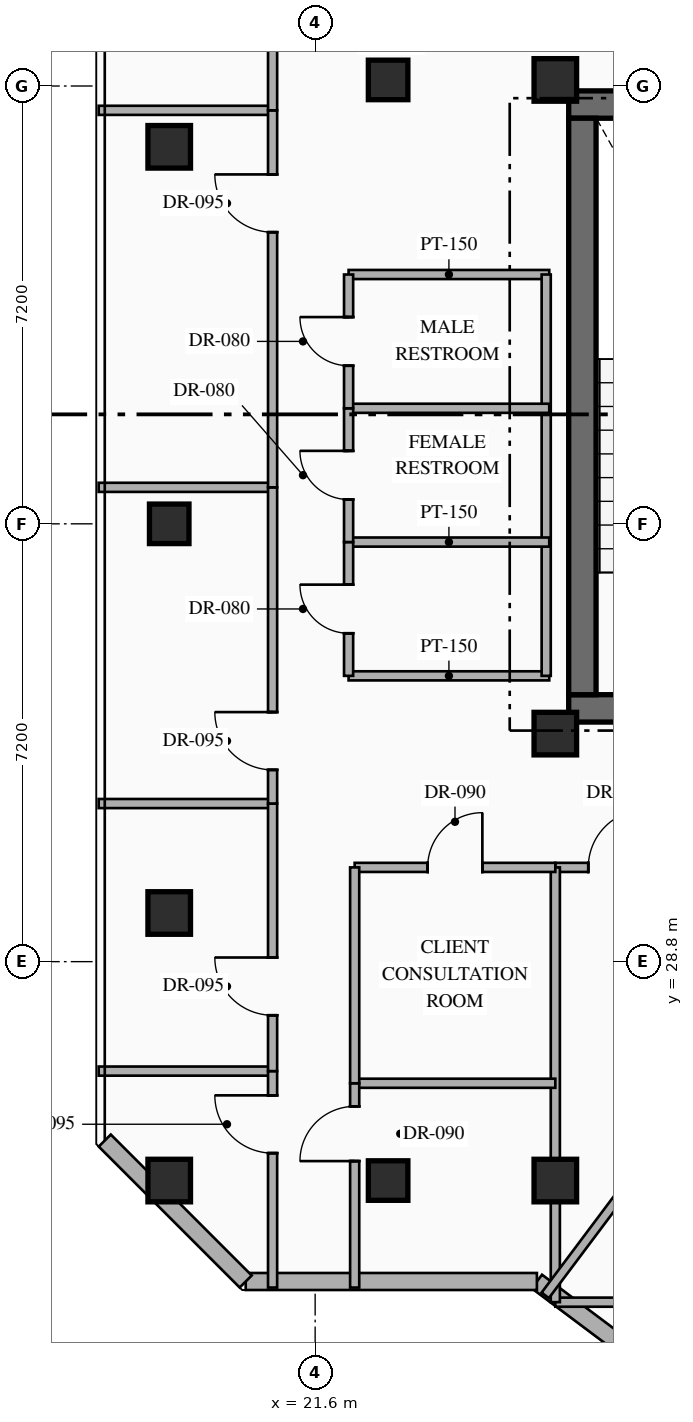
"""IFC4 building model, lengths in metres.
Left out: names, types, materials, properties, quantities, classifications, styles, units other than length and angle.
Written with IfcOpenShell. Run it as: python <this file> out.ifc"""

import sys

from ifc_helpers import new_model, si_unit, direction, frame, frame_2d, origin, origin_2d, place, context, subcontext, project, spatial, rectangle, hollow_rectangle, extrude, element, fill, save


model = new_model("IFC4")
c1 = context("Model", 3, precision=1e-05, world=origin(), true_north=direction((0.0, 1.0)))
c2 = subcontext(c1, "Body", "Model", "MODEL_VIEW")
j1 = project(units=[si_unit("LENGTHUNIT", "METRE"), si_unit("PLANEANGLEUNIT", "RADIAN")], contexts=[c1])
p1 = place(None, origin())
s1 = spatial("IfcSite", under=j1, at=p1, CompositionType="ELEMENT")
p2 = place(p1, origin())
s2 = spatial("IfcBuilding", under=s1, at=p2, CompositionType="ELEMENT")
p3 = place(p2, frame((0.0, 0.0, 223.95)))
s3 = spatial("IfcBuildingStorey", under=s2, at=p3, CompositionType="ELEMENT", Elevation=223.95)
p4 = place(p3, frame((25.77, 32.965, 0.0), z_axis=(0.0, 0.0, 1.0), x_axis=(1.0, 0.0, 0.0)))
e1 = element("IfcWall", 1, at=p4, inside=s3, PredefinedType="SHEAR", context=c2, shape_type="SweptSolid", body=[
    extrude(rectangle(XDim=7.48, YDim=0.45, at=frame_2d((3.74, 0.0))), origin(), (0.0, 0.0, 1.0), 3.6),
])
p5 = place(p4, frame((2.68, 0.0, 0.0)))
e2 = element("IfcOpeningElement", 2, at=p5, cuts=e1, PredefinedType="OPENING", context=c2, shape_type="SweptSolid", body=[
    extrude(rectangle(XDim=1.1, YDim=2.2, at=frame_2d((0.55, 1.1))), frame((0.0, 0.235, 0.0), z_axis=(0.0, -1.0, 0.0), x_axis=(1.0, 0.0, 0.0)), (0.0, 0.0, 1.0), 0.47),
])
p6 = place(p4, frame((5.43, 0.0, 0.0)))
e3 = element("IfcOpeningElement", 3, at=p6, cuts=e1, PredefinedType="OPENING", context=c2, shape_type="SweptSolid", body=[
    extrude(rectangle(XDim=1.1, YDim=2.15, at=frame_2d((0.55, 1.075))), frame((0.0, 0.235, 0.0), z_axis=(0.0, -1.0, 0.0), x_axis=(1.0, 0.0, 0.0)), (0.0, 0.0, 1.0), 0.47),
])
p7 = place(p3, frame((25.77, 42.895, 0.0), z_axis=(0.0, 0.0, 1.0), x_axis=(1.0, 0.0, 0.0)))
e4 = element("IfcWall", 4, at=p7, inside=s3, PredefinedType="SHEAR", context=c2, shape_type="SweptSolid", body=[
    extrude(rectangle(XDim=7.48, YDim=0.45, at=frame_2d((3.74, 0.0))), origin(), (0.0, 0.0, 1.0), 3.6),
])
p8 = place(p3, frame((25.995, 33.19, 0.0), z_axis=(0.0, 0.0, 1.0), x_axis=(0.0, 1.0, 0.0)))
e5 = element("IfcWall", 5, at=p8, inside=s3, PredefinedType="SHEAR", context=c2, shape_type="SweptSolid", body=[
    extrude(rectangle(XDim=9.48, YDim=0.45, at=frame_2d((4.74, 0.0))), origin(), (0.0, 0.0, 1.0), 3.6),
])
for number, where, z_axis, x_axis in (
    (6, (25.55, 32.55, 0.0), (0.0, 0.0, 1.0), (1.0, 0.0, 0.0)),
    (7, (25.55, 43.3, 0.0), (0.0, 0.0, 1.0), (1.0, 0.0, 0.0)),
    (8, (25.55, 25.2, 0.0), (0.0, 0.0, 1.0), (1.0, 0.0, 0.0)),
    (9, (19.2, 25.2, 0.0), (0.0, 0.0, 1.0), (1.0, 0.0, 0.0)),
    (10, (19.2, 29.6, 0.0), (0.0, 0.0, 1.0), (1.0, 0.0, 0.0)),
    (11, (19.2, 42.2, 0.0), (0.0, 0.0, 1.0), (1.0, 0.0, 0.0)),
):
    element("IfcColumn", number, at=place(p3, frame(where, z_axis=z_axis, x_axis=x_axis)), inside=s3, PredefinedType="COLUMN", context=c2, shape_type="SweptSolid", body=[
        extrude(hollow_rectangle(XDim=0.7, YDim=0.7, WallThickness=0.028, at=origin_2d()), origin(), (0.0, 0.0, 1.0), 3.6),
    ])
for number, where, z_axis, x_axis in (
    (12, (22.8, 25.2, 0.0), (0.0, 0.0, 1.0), (1.0, 0.0, 0.0)),
    (13, (22.8, 43.3, 0.0), (0.0, 0.0, 1.0), (1.0, 0.0, 0.0)),
    (14, (19.2, 36.0, 0.0), (0.0, 0.0, 1.0), (1.0, 0.0, 0.0)),
):
    element("IfcColumn", number, at=place(p3, frame(where, z_axis=z_axis, x_axis=x_axis)), inside=s3, PredefinedType="COLUMN", context=c2, shape_type="SweptSolid", body=[
        extrude(hollow_rectangle(XDim=0.65, YDim=0.65, WallThickness=0.025, at=origin_2d()), origin(), (0.0, 0.0, 1.0), 3.6),
    ])
p9 = place(p3, frame((44.918, 8.787, 0.0), z_axis=(0.0, 0.0, 1.0), x_axis=(-0.800004765927, 0.599993645378, 0.0)))
e15 = element("IfcWall", 15, at=p9, inside=s3, PredefinedType="STANDARD", context=c2, shape_type="SweptSolid", body=[
    extrude(rectangle(XDim=24.588, YDim=0.28, at=frame_2d((12.294, 0.0))), origin(), (0.0, 0.0, 1.0), 3.35),
])
p10 = place(p3, frame((25.247, 23.54, 0.0), z_axis=(0.0, 0.0, 1.0), x_axis=(-1.0, 0.0, 0.0)))
e16 = element("IfcWall", 16, at=p10, inside=s3, PredefinedType="STANDARD", context=c2, shape_type="SweptSolid", body=[
    extrude(rectangle(XDim=4.789, YDim=0.28, at=frame_2d((2.395, 0.0))), origin(), (0.0, 0.0, 1.0), 3.35),
])
p11 = place(p3, frame((20.458, 23.54, 0.0), z_axis=(0.0, 0.0, 1.0), x_axis=(-0.707144017911, 0.707069542501, 0.0)))
e17 = element("IfcWall", 17, at=p11, inside=s3, PredefinedType="STANDARD", context=c2, shape_type="SweptSolid", body=[
    extrude(rectangle(XDim=3.278, YDim=0.28, at=frame_2d((1.639, 0.0))), origin(), (0.0, 0.0, 1.0), 3.35),
])
for number, where, z_axis, x_axis in (
    (18, (22.15, 33.5, 0.0), (0.0, 0.0, 1.0), (1.0, 0.0, 0.0)),
    (19, (22.15, 40.1, 0.0), (0.0, 0.0, 1.0), (1.0, 0.0, 0.0)),
):
    element("IfcWall", number, at=place(p3, frame(where, z_axis=z_axis, x_axis=x_axis)), inside=s3, PredefinedType="PARTITIONING", context=c2, shape_type="SweptSolid", body=[
        extrude(rectangle(XDim=3.3, YDim=0.15, at=frame_2d((1.65, 0.0))), origin(), (0.0, 0.0, 1.0), 3.35),
    ])
p12 = place(p3, frame((25.4, 33.5, 0.0), z_axis=(0.0, 0.0, 1.0), x_axis=(0.0, 1.0, 0.0)))
e20 = element("IfcWall", 20, at=p12, inside=s3, PredefinedType="PARTITIONING", context=c2, shape_type="SweptSolid", body=[
    extrude(rectangle(XDim=6.6, YDim=0.15, at=frame_2d((3.3, 0.0))), origin(), (0.0, 0.0, 1.0), 3.35),
])
for number, where, z_axis, x_axis in (
    (21, (22.15, 35.7, 0.0), (0.0, 0.0, 1.0), (1.0, 0.0, 0.0)),
    (22, (22.15, 37.9, 0.0), (0.0, 0.0, 1.0), (1.0, 0.0, 0.0)),
):
    element("IfcWall", number, at=place(p3, frame(where, z_axis=z_axis, x_axis=x_axis)), inside=s3, PredefinedType="PARTITIONING", context=c2, shape_type="SweptSolid", body=[
        extrude(rectangle(XDim=3.3, YDim=0.15, at=frame_2d((1.65, 0.0))), origin(), (0.0, 0.0, 1.0), 3.35),
    ])
p13 = place(p3, frame((22.15, 33.5, 0.0), z_axis=(0.0, 0.0, 1.0), x_axis=(0.0, 1.0, 0.0)))
e23 = element("IfcWall", 23, at=p13, inside=s3, PredefinedType="PARTITIONING", context=c2, shape_type="SweptSolid", body=[
    extrude(rectangle(XDim=2.2, YDim=0.15, at=frame_2d((1.1, 0.0))), origin(), (0.0, 0.0, 1.0), 3.35),
])
p14 = place(p13, frame((0.7, 0.0, 0.0)))
e24 = element("IfcOpeningElement", 24, at=p14, cuts=e23, PredefinedType="OPENING", context=c2, shape_type="SweptSolid", body=[
    extrude(rectangle(XDim=0.8, YDim=2.06, at=frame_2d((0.4, 1.03))), frame((0.0, 0.085, 0.0), z_axis=(0.0, -1.0, 0.0), x_axis=(1.0, 0.0, 0.0)), (0.0, 0.0, 1.0), 0.17),
])
p15 = place(p3, frame((22.15, 35.7, 0.0), z_axis=(0.0, 0.0, 1.0), x_axis=(0.0, 1.0, 0.0)))
e25 = element("IfcWall", 25, at=p15, inside=s3, PredefinedType="PARTITIONING", context=c2, shape_type="SweptSolid", body=[
    extrude(rectangle(XDim=2.2, YDim=0.15, at=frame_2d((1.1, 0.0))), origin(), (0.0, 0.0, 1.0), 3.35),
])
p16 = place(p15, frame((0.7, 0.0, 0.0)))
e26 = element("IfcOpeningElement", 26, at=p16, cuts=e25, PredefinedType="OPENING", context=c2, shape_type="SweptSolid", body=[
    extrude(rectangle(XDim=0.8, YDim=2.06, at=frame_2d((0.4, 1.03))), frame((0.0, 0.085, 0.0), z_axis=(0.0, -1.0, 0.0), x_axis=(1.0, 0.0, 0.0)), (0.0, 0.0, 1.0), 0.17),
])
p17 = place(p3, frame((22.15, 37.9, 0.0), z_axis=(0.0, 0.0, 1.0), x_axis=(0.0, 1.0, 0.0)))
e27 = element("IfcWall", 27, at=p17, inside=s3, PredefinedType="PARTITIONING", context=c2, shape_type="SweptSolid", body=[
    extrude(rectangle(XDim=2.2, YDim=0.15, at=frame_2d((1.1, 0.0))), origin(), (0.0, 0.0, 1.0), 3.35),
])
p18 = place(p17, frame((0.7, 0.0, 0.0)))
e28 = element("IfcOpeningElement", 28, at=p18, cuts=e27, PredefinedType="OPENING", context=c2, shape_type="SweptSolid", body=[
    extrude(rectangle(XDim=0.8, YDim=2.06, at=frame_2d((0.4, 1.03))), frame((0.0, 0.085, 0.0), z_axis=(0.0, -1.0, 0.0), x_axis=(1.0, 0.0, 0.0)), (0.0, 0.0, 1.0), 0.17),
])
p19 = place(p3, frame((25.55, 23.2, 0.0), z_axis=(0.0, 0.0, 1.0), x_axis=(1.0, 0.0, 0.0)))
e29 = element("IfcWall", 29, at=p19, inside=s3, PredefinedType="PARTITIONING", context=c2, shape_type="SweptSolid", body=[
    extrude(rectangle(XDim=4.95, YDim=0.15, at=frame_2d((2.475, 0.0))), origin(), (0.0, 0.0, 1.0), 3.35),
])
p20 = place(p3, frame((25.55, 30.35, 0.0), z_axis=(0.0, 0.0, 1.0), x_axis=(1.0, 0.0, 0.0)))
e30 = element("IfcWall", 30, at=p20, inside=s3, PredefinedType="PARTITIONING", context=c2, shape_type="SweptSolid", body=[
    extrude(rectangle(XDim=4.95, YDim=0.15, at=frame_2d((2.475, 0.0))), origin(), (0.0, 0.0, 1.0), 3.35),
])
p21 = place(p20, frame((0.542, 0.0, 0.0)))
e31 = element("IfcOpeningElement", 31, at=p21, cuts=e30, PredefinedType="OPENING", context=c2, shape_type="SweptSolid", body=[
    extrude(rectangle(XDim=0.95, YDim=2.15, at=frame_2d((0.475, 1.075))), frame((0.0, 0.085, 0.0), z_axis=(0.0, -1.0, 0.0), x_axis=(1.0, 0.0, 0.0)), (0.0, 0.0, 1.0), 0.17),
])
p22 = place(p3, frame((25.55, 23.2, 0.0), z_axis=(0.0, 0.0, 1.0), x_axis=(0.0, 1.0, 0.0)))
e32 = element("IfcWall", 32, at=p22, inside=s3, PredefinedType="PARTITIONING", context=c2, shape_type="SweptSolid", body=[
    extrude(rectangle(XDim=7.15, YDim=0.15, at=frame_2d((3.575, 0.0))), origin(), (0.0, 0.0, 1.0), 2.757),
])
p23 = place(p3, frame((18.04, 27.0, 0.0), z_axis=(0.0, 0.0, 1.0), x_axis=(1.0, 0.0, 0.0)))
e33 = element("IfcWall", 33, at=p23, inside=s3, PredefinedType="PARTITIONING", context=c2, shape_type="SweptSolid", body=[
    extrude(rectangle(XDim=2.86, YDim=0.15, at=frame_2d((1.43, 0.0))), origin(), (0.0, 0.0, 1.0), 3.35),
])
p24 = place(p3, frame((20.9, 23.44, 0.0), z_axis=(0.0, 0.0, 1.0), x_axis=(0.0, 1.0, 0.0)))
e34 = element("IfcWall", 34, at=p24, inside=s3, PredefinedType="PARTITIONING", context=c2, shape_type="SweptSolid", body=[
    extrude(rectangle(XDim=3.56, YDim=0.15, at=frame_2d((1.78, 0.0))), origin(), (0.0, 0.0, 1.0), 3.35),
])
p25 = place(p24, frame((2.211, 0.0, 0.0)))
e35 = element("IfcOpeningElement", 35, at=p25, cuts=e34, PredefinedType="OPENING", context=c2, shape_type="SweptSolid", body=[
    extrude(rectangle(XDim=0.95, YDim=2.15, at=frame_2d((0.475, 1.075))), frame((0.0, 0.085, 0.0), z_axis=(0.0, -1.0, 0.0), x_axis=(1.0, 0.0, 0.0)), (0.0, 0.0, 1.0), 0.17),
])
p26 = place(p3, frame((18.04, 31.4, 0.0), z_axis=(0.0, 0.0, 1.0), x_axis=(1.0, 0.0, 0.0)))
e36 = element("IfcWall", 36, at=p26, inside=s3, PredefinedType="PARTITIONING", context=c2, shape_type="SweptSolid", body=[
    extrude(rectangle(XDim=2.86, YDim=0.15, at=frame_2d((1.43, 0.0))), origin(), (0.0, 0.0, 1.0), 3.35),
])
p27 = place(p3, frame((20.9, 27.0, 0.0), z_axis=(0.0, 0.0, 1.0), x_axis=(0.0, 1.0, 0.0)))
e37 = element("IfcWall", 37, at=p27, inside=s3, PredefinedType="PARTITIONING", context=c2, shape_type="SweptSolid", body=[
    extrude(rectangle(XDim=4.4, YDim=0.15, at=frame_2d((2.2, 0.0))), origin(), (0.0, 0.0, 1.0), 3.35),
])
p28 = place(p27, frame((0.918, 0.0, 0.0)))
e38 = element("IfcOpeningElement", 38, at=p28, cuts=e37, PredefinedType="OPENING", context=c2, shape_type="SweptSolid", body=[
    extrude(rectangle(XDim=0.95, YDim=2.15, at=frame_2d((0.475, 1.075))), frame((0.0, 0.085, 0.0), z_axis=(0.0, -1.0, 0.0), x_axis=(1.0, 0.0, 0.0)), (0.0, 0.0, 1.0), 0.17),
])
p29 = place(p3, frame((18.04, 36.6, 0.0), z_axis=(0.0, 0.0, 1.0), x_axis=(1.0, 0.0, 0.0)))
e39 = element("IfcWall", 39, at=p29, inside=s3, PredefinedType="PARTITIONING", context=c2, shape_type="SweptSolid", body=[
    extrude(rectangle(XDim=2.86, YDim=0.15, at=frame_2d((1.43, 0.0))), origin(), (0.0, 0.0, 1.0), 3.35),
])
p30 = place(p3, frame((20.9, 31.4, 0.0), z_axis=(0.0, 0.0, 1.0), x_axis=(0.0, 1.0, 0.0)))
e40 = element("IfcWall", 40, at=p30, inside=s3, PredefinedType="PARTITIONING", context=c2, shape_type="SweptSolid", body=[
    extrude(rectangle(XDim=5.2, YDim=0.15, at=frame_2d((2.6, 0.0))), origin(), (0.0, 0.0, 1.0), 3.35),
])
p31 = place(p30, frame((0.554, 0.0, 0.0)))
e41 = element("IfcOpeningElement", 41, at=p31, cuts=e40, PredefinedType="OPENING", context=c2, shape_type="SweptSolid", body=[
    extrude(rectangle(XDim=0.95, YDim=2.15, at=frame_2d((0.475, 1.075))), frame((0.0, 0.085, 0.0), z_axis=(0.0, -1.0, 0.0), x_axis=(1.0, 0.0, 0.0)), (0.0, 0.0, 1.0), 0.17),
])
p32 = place(p3, frame((18.04, 42.8, 0.0), z_axis=(0.0, 0.0, 1.0), x_axis=(1.0, 0.0, 0.0)))
e42 = element("IfcWall", 42, at=p32, inside=s3, PredefinedType="PARTITIONING", context=c2, shape_type="SweptSolid", body=[
    extrude(rectangle(XDim=2.86, YDim=0.15, at=frame_2d((1.43, 0.0))), origin(), (0.0, 0.0, 1.0), 3.35),
])
p33 = place(p3, frame((20.9, 36.6, 0.0), z_axis=(0.0, 0.0, 1.0), x_axis=(0.0, 1.0, 0.0)))
e43 = element("IfcWall", 43, at=p33, inside=s3, PredefinedType="PARTITIONING", context=c2, shape_type="SweptSolid", body=[
    extrude(rectangle(XDim=6.2, YDim=0.15, at=frame_2d((3.1, 0.0))), origin(), (0.0, 0.0, 1.0), 3.35),
])
p34 = place(p33, frame((4.196, 0.0, 0.0)))
e44 = element("IfcOpeningElement", 44, at=p34, cuts=e43, PredefinedType="OPENING", context=c2, shape_type="SweptSolid", body=[
    extrude(rectangle(XDim=0.95, YDim=2.15, at=frame_2d((0.475, 1.075))), frame((0.0, 0.085, 0.0), z_axis=(0.0, -1.0, 0.0), x_axis=(1.0, 0.0, 0.0)), (0.0, 0.0, 1.0), 0.17),
])
p35 = place(p3, frame((20.9, 42.8, 0.0), z_axis=(0.0, 0.0, 1.0), x_axis=(0.0, 1.0, 0.0)))
e45 = element("IfcWall", 45, at=p35, inside=s3, PredefinedType="PARTITIONING", context=c2, shape_type="SweptSolid", body=[
    extrude(rectangle(XDim=7.56, YDim=0.15, at=frame_2d((3.78, 0.0))), origin(), (0.0, 0.0, 1.0), 3.35),
])
p36 = place(p35, frame((3.305, 0.0, 0.0)))
e46 = element("IfcOpeningElement", 46, at=p36, cuts=e45, PredefinedType="OPENING", context=c2, shape_type="SweptSolid", body=[
    extrude(rectangle(XDim=0.95, YDim=2.15, at=frame_2d((0.475, 1.075))), frame((0.0, 0.085, 0.0), z_axis=(0.0, -1.0, 0.0), x_axis=(1.0, 0.0, 0.0)), (0.0, 0.0, 1.0), 0.17),
])
p37 = place(p3, frame((22.25, 26.8, 0.0), z_axis=(0.0, 0.0, 1.0), x_axis=(1.0, 0.0, 0.0)))
e47 = element("IfcWall", 47, at=p37, inside=s3, PredefinedType="PARTITIONING", context=c2, shape_type="SweptSolid", body=[
    extrude(rectangle(XDim=3.3, YDim=0.15, at=frame_2d((1.65, 0.0))), origin(), (0.0, 0.0, 1.0), 3.35),
])
p38 = place(p3, frame((22.25, 23.44, 0.0), z_axis=(0.0, 0.0, 1.0), x_axis=(0.0, 1.0, 0.0)))
e48 = element("IfcWall", 48, at=p38, inside=s3, PredefinedType="PARTITIONING", context=c2, shape_type="SweptSolid", body=[
    extrude(rectangle(XDim=3.36, YDim=0.15, at=frame_2d((1.68, 0.0))), origin(), (0.0, 0.0, 1.0), 3.35),
])
p39 = place(p38, frame((2.08, 0.0, 0.0)))
e49 = element("IfcOpeningElement", 49, at=p39, cuts=e48, PredefinedType="OPENING", context=c2, shape_type="SweptSolid", body=[
    extrude(rectangle(XDim=0.9, YDim=2.15, at=frame_2d((0.45, 1.075))), frame((0.0, 0.085, 0.0), z_axis=(0.0, -1.0, 0.0), x_axis=(1.0, 0.0, 0.0)), (0.0, 0.0, 1.0), 0.17),
])
p40 = place(p3, frame((22.25, 30.35, 0.0), z_axis=(0.0, 0.0, 1.0), x_axis=(1.0, 0.0, 0.0)))
e50 = element("IfcWall", 50, at=p40, inside=s3, PredefinedType="PARTITIONING", context=c2, shape_type="SweptSolid", body=[
    extrude(rectangle(XDim=3.3, YDim=0.15, at=frame_2d((1.65, 0.0))), origin(), (0.0, 0.0, 1.0), 3.35),
])
p41 = place(p40, frame((1.2, 0.0, 0.0)))
e51 = element("IfcOpeningElement", 51, at=p41, cuts=e50, PredefinedType="OPENING", context=c2, shape_type="SweptSolid", body=[
    extrude(rectangle(XDim=0.9, YDim=2.15, at=frame_2d((0.45, 1.075))), frame((0.0, 0.085, 0.0), z_axis=(0.0, -1.0, 0.0), x_axis=(1.0, 0.0, 0.0)), (0.0, 0.0, 1.0), 0.17),
])
p42 = place(p3, frame((22.25, 26.8, 0.0), z_axis=(0.0, 0.0, 1.0), x_axis=(0.0, 1.0, 0.0)))
e52 = element("IfcWall", 52, at=p42, inside=s3, PredefinedType="PARTITIONING", context=c2, shape_type="SweptSolid", body=[
    extrude(rectangle(XDim=3.55, YDim=0.15, at=frame_2d((1.775, 0.0))), origin(), (0.0, 0.0, 1.0), 3.35),
])
p43 = place(p3, frame((25.384, 23.312, 0.0), z_axis=(0.0, 0.0, 1.0), x_axis=(0.599990721155, 0.80000695905, 0.0)))
e53 = element("IfcWall", 53, at=p43, inside=s3, PredefinedType="PARTITIONING", context=c2, shape_type="SweptSolid", body=[
    extrude(rectangle(XDim=4.21, YDim=0.15, at=frame_2d((2.105, 0.0))), origin(), (0.0, 0.0, 1.0), 3.35),
])
p44 = place(p14, origin())
e54 = element("IfcDoor", 54, at=p44, inside=s3, OperationType="SINGLE_SWING_RIGHT", PredefinedType="DOOR", context=c2, shape_type="SweptSolid", body=[
    extrude(rectangle(XDim=0.8, YDim=2.06, at=frame_2d((0.4, 1.03))), frame((0.0, 0.025, 0.0), z_axis=(0.0, -1.0, 0.0), x_axis=(1.0, 0.0, 0.0)), (0.0, 0.0, 1.0), 0.05),
])
fill(e24, e54)
p45 = place(p16, origin())
e55 = element("IfcDoor", 55, at=p45, inside=s3, OperationType="SINGLE_SWING_RIGHT", PredefinedType="DOOR", context=c2, shape_type="SweptSolid", body=[
    extrude(rectangle(XDim=0.8, YDim=2.06, at=frame_2d((0.4, 1.03))), frame((0.0, 0.025, 0.0), z_axis=(0.0, -1.0, 0.0), x_axis=(1.0, 0.0, 0.0)), (0.0, 0.0, 1.0), 0.05),
])
fill(e26, e55)
p46 = place(p18, origin())
e56 = element("IfcDoor", 56, at=p46, inside=s3, OperationType="SINGLE_SWING_RIGHT", PredefinedType="DOOR", context=c2, shape_type="SweptSolid", body=[
    extrude(rectangle(XDim=0.8, YDim=2.06, at=frame_2d((0.4, 1.03))), frame((0.0, 0.025, 0.0), z_axis=(0.0, -1.0, 0.0), x_axis=(1.0, 0.0, 0.0)), (0.0, 0.0, 1.0), 0.05),
])
fill(e28, e56)
p47 = place(p21, origin())
e57 = element("IfcDoor", 57, at=p47, inside=s3, OperationType="SINGLE_SWING_RIGHT", PredefinedType="DOOR", context=c2, shape_type="SweptSolid", body=[
    extrude(rectangle(XDim=0.95, YDim=2.15, at=frame_2d((0.475, 1.075))), frame((0.0, 0.025, 0.0), z_axis=(0.0, -1.0, 0.0), x_axis=(1.0, 0.0, 0.0)), (0.0, 0.0, 1.0), 0.05),
])
fill(e31, e57)
p48 = place(p25, origin())
e58 = element("IfcDoor", 58, at=p48, inside=s3, OperationType="SINGLE_SWING_RIGHT", PredefinedType="DOOR", context=c2, shape_type="SweptSolid", body=[
    extrude(rectangle(XDim=0.95, YDim=2.15, at=frame_2d((0.475, 1.075))), frame((0.0, 0.025, 0.0), z_axis=(0.0, -1.0, 0.0), x_axis=(1.0, 0.0, 0.0)), (0.0, 0.0, 1.0), 0.05),
])
fill(e35, e58)
p49 = place(p28, origin())
e59 = element("IfcDoor", 59, at=p49, inside=s3, OperationType="SINGLE_SWING_RIGHT", PredefinedType="DOOR", context=c2, shape_type="SweptSolid", body=[
    extrude(rectangle(XDim=0.95, YDim=2.15, at=frame_2d((0.475, 1.075))), frame((0.0, 0.025, 0.0), z_axis=(0.0, -1.0, 0.0), x_axis=(1.0, 0.0, 0.0)), (0.0, 0.0, 1.0), 0.05),
])
fill(e38, e59)
p50 = place(p31, origin())
e60 = element("IfcDoor", 60, at=p50, inside=s3, OperationType="SINGLE_SWING_RIGHT", PredefinedType="DOOR", context=c2, shape_type="SweptSolid", body=[
    extrude(rectangle(XDim=0.95, YDim=2.15, at=frame_2d((0.475, 1.075))), frame((0.0, 0.025, 0.0), z_axis=(0.0, -1.0, 0.0), x_axis=(1.0, 0.0, 0.0)), (0.0, 0.0, 1.0), 0.05),
])
fill(e41, e60)
p51 = place(p34, origin())
e61 = element("IfcDoor", 61, at=p51, inside=s3, OperationType="SINGLE_SWING_RIGHT", PredefinedType="DOOR", context=c2, shape_type="SweptSolid", body=[
    extrude(rectangle(XDim=0.95, YDim=2.15, at=frame_2d((0.475, 1.075))), frame((0.0, 0.025, 0.0), z_axis=(0.0, -1.0, 0.0), x_axis=(1.0, 0.0, 0.0)), (0.0, 0.0, 1.0), 0.05),
])
fill(e44, e61)
p52 = place(p39, origin())
e62 = element("IfcDoor", 62, at=p52, inside=s3, OperationType="SINGLE_SWING_LEFT", PredefinedType="DOOR", context=c2, shape_type="SweptSolid", body=[
    extrude(rectangle(XDim=0.9, YDim=2.15, at=frame_2d((0.45, 1.075))), frame((0.0, 0.025, 0.0), z_axis=(0.0, -1.0, 0.0), x_axis=(1.0, 0.0, 0.0)), (0.0, 0.0, 1.0), 0.05),
])
fill(e49, e62)
p53 = place(p41, origin())
e63 = element("IfcDoor", 63, at=p53, inside=s3, OperationType="SINGLE_SWING_RIGHT", PredefinedType="DOOR", context=c2, shape_type="SweptSolid", body=[
    extrude(rectangle(XDim=0.9, YDim=2.15, at=frame_2d((0.45, 1.075))), frame((0.0, 0.025, 0.0), z_axis=(0.0, -1.0, 0.0), x_axis=(1.0, 0.0, 0.0)), (0.0, 0.0, 1.0), 0.05),
])
fill(e51, e63)
save(model, sys.argv[1])
